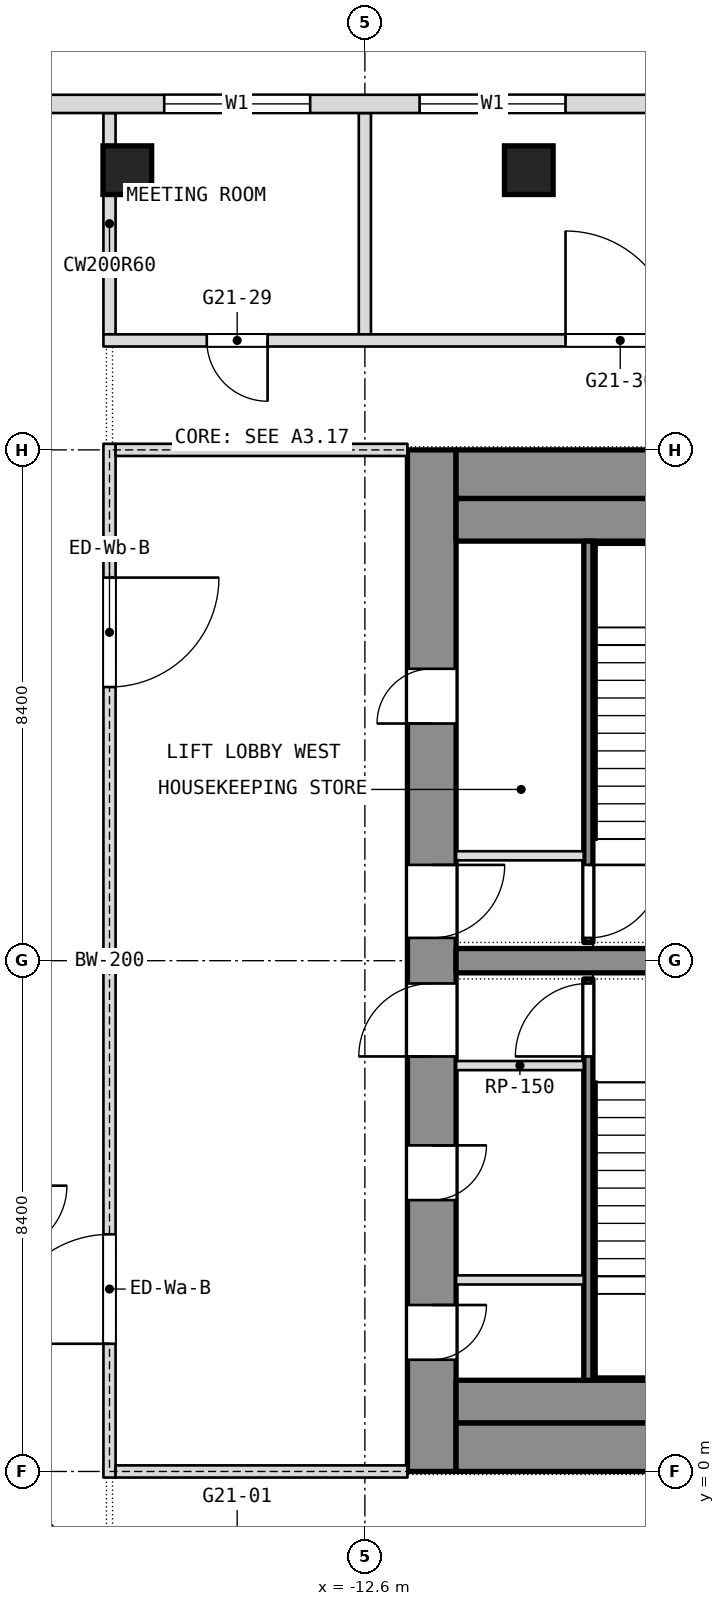
"""IFC4 building model, lengths in metres.
Left out: names, types, materials, properties, quantities, classifications, styles, units other than length and angle.
Written with IfcOpenShell. Run it as: python <this file> out.ifc"""

import sys

from ifc_helpers import new_model, si_unit, direction, frame, frame_2d, origin, origin_2d, place, context, subcontext, project, spatial, rectangle, extrude, element, fill, save


model = new_model("IFC4")
c1 = context("Model", 3, precision=1e-05, world=origin(), true_north=direction((0.0, 1.0)))
c2 = subcontext(c1, "Body", "Model", "MODEL_VIEW")
j1 = project(units=[si_unit("LENGTHUNIT", "METRE"), si_unit("PLANEANGLEUNIT", "RADIAN")], contexts=[c1])
p1 = place(None, origin())
s1 = spatial("IfcSite", under=j1, at=p1, CompositionType="ELEMENT")
p2 = place(p1, origin())
s2 = spatial("IfcBuilding", under=s1, at=p2, CompositionType="ELEMENT")
p3 = place(p2, frame((0.0, 0.0, 241.7)))
s3 = spatial("IfcBuildingStorey", under=s2, at=p3, CompositionType="ELEMENT", Elevation=241.7)
p4 = place(p3, frame((-11.5, 0.0, 0.0), z_axis=(0.0, 0.0, 1.0), x_axis=(0.0, 1.0, 0.0)))
e1 = element("IfcWall", 1, at=p4, inside=s3, PredefinedType="SHEAR", context=c2, shape_type="SweptSolid", body=[
    extrude(rectangle(XDim=16.8, YDim=0.8, at=frame_2d((8.4, 0.0))), origin(), (0.0, 0.0, 1.0), 3.6),
])
p5 = place(p4, frame((1.837, 0.0, 0.0)))
e2 = element("IfcOpeningElement", 2, at=p5, cuts=e1, PredefinedType="OPENING", context=c2, shape_type="SweptSolid", body=[
    extrude(rectangle(XDim=0.9, YDim=2.1, at=frame_2d((0.45, 1.05))), frame((0.0, 0.4, 0.0), z_axis=(0.0, -1.0, 0.0), x_axis=(1.0, 0.0, 0.0)), (0.0, 0.0, 1.0), 0.8),
])
p6 = place(p4, frame((4.462, 0.0, 0.0)))
e3 = element("IfcOpeningElement", 3, at=p6, cuts=e1, PredefinedType="OPENING", context=c2, shape_type="SweptSolid", body=[
    extrude(rectangle(XDim=0.9, YDim=2.1, at=frame_2d((0.45, 1.05))), frame((0.0, 0.4, 0.0), z_axis=(0.0, -1.0, 0.0), x_axis=(1.0, 0.0, 0.0)), (0.0, 0.0, 1.0), 0.8),
])
p7 = place(p4, frame((6.825, 0.0, 0.0)))
e4 = element("IfcOpeningElement", 4, at=p7, cuts=e1, PredefinedType="OPENING", context=c2, shape_type="SweptSolid", body=[
    extrude(rectangle(XDim=1.2, YDim=2.1, at=frame_2d((0.6, 1.05))), frame((0.0, 0.4, 0.0), z_axis=(0.0, -1.0, 0.0), x_axis=(1.0, 0.0, 0.0)), (0.0, 0.0, 1.0), 0.8),
])
p8 = place(p4, frame((12.3, 0.0, 0.0)))
e5 = element("IfcOpeningElement", 5, at=p8, cuts=e1, PredefinedType="OPENING", context=c2, shape_type="SweptSolid", body=[
    extrude(rectangle(XDim=0.9, YDim=2.1, at=frame_2d((0.45, 1.05))), frame((0.0, 0.4, 0.0), z_axis=(0.0, -1.0, 0.0), x_axis=(1.0, 0.0, 0.0)), (0.0, 0.0, 1.0), 0.8),
])
p9 = place(p4, frame((8.775, 0.0, 0.0)))
e6 = element("IfcOpeningElement", 6, at=p9, cuts=e1, PredefinedType="OPENING", context=c2, shape_type="SweptSolid", body=[
    extrude(rectangle(XDim=1.2, YDim=2.1, at=frame_2d((0.6, 1.05))), frame((0.0, 0.4, 0.0), z_axis=(0.0, -1.0, 0.0), x_axis=(1.0, 0.0, 0.0)), (0.0, 0.0, 1.0), 0.8),
])
for number, where, z_axis, x_axis in (
    (7, (-11.1, 0.4, 0.0), (0.0, 0.0, 1.0), (1.0, 0.0, 0.0)),
    (8, (-11.1, 16.4, 0.0), (0.0, 0.0, 1.0), (1.0, 0.0, 0.0)),
):
    element("IfcWall", number, at=place(p3, frame(where, z_axis=z_axis, x_axis=x_axis)), inside=s3, PredefinedType="SHEAR", context=c2, shape_type="SweptSolid", body=[
        extrude(rectangle(XDim=22.2, YDim=0.8, at=frame_2d((11.1, 0.0))), origin(), (0.0, 0.0, 1.0), 3.6),
    ])
p10 = place(p3, frame((-11.1, 8.4, 0.0), z_axis=(0.0, 0.0, 1.0), x_axis=(1.0, 0.0, 0.0)))
e9 = element("IfcWall", 9, at=p10, inside=s3, PredefinedType="SHEAR", context=c2, shape_type="SweptSolid", body=[
    extrude(rectangle(XDim=6.7, YDim=0.4, at=frame_2d((3.35, 0.0))), origin(), (0.0, 0.0, 1.0), 3.6),
])
for number, where, z_axis, x_axis in (
    (10, (-16.507, 21.4, 0.0), (0.0, 0.0, 1.0), (1.0, 0.0, 0.0)),
    (11, (-9.904, 21.4, 0.0), (0.0, 0.0, 1.0), (1.0, 0.0, 0.0)),
):
    element("IfcColumn", number, at=place(p3, frame(where, z_axis=z_axis, x_axis=x_axis)), inside=s3, PredefinedType="COLUMN", context=c2, shape_type="SweptSolid", body=[
        extrude(rectangle(XDim=0.8, YDim=0.8, at=origin_2d()), origin(), (0.0, 0.0, 1.0), 3.6),
    ])
for number, where, z_axis, x_axis in (
    (12, (-12.6, 18.7, 0.0), (0.0, 0.0, 1.0), (0.0, 1.0, 0.0)),
    (13, (-16.8, 18.7, 0.0), (0.0, 0.0, 1.0), (0.0, 1.0, 0.0)),
):
    element("IfcWall", number, at=place(p3, frame(where, z_axis=z_axis, x_axis=x_axis)), inside=s3, PredefinedType="PARTITIONING", context=c2, shape_type="SweptSolid", body=[
        extrude(rectangle(XDim=3.64, YDim=0.2, at=frame_2d((1.82, 0.0))), origin(), (0.0, 0.0, 1.0), 3.34),
    ])
p11 = place(p3, frame((-16.9, 18.6, 0.0), z_axis=(0.0, 0.0, 1.0), x_axis=(1.0, 0.0, 0.0)))
e14 = element("IfcWall", 14, at=p11, inside=s3, PredefinedType="PARTITIONING", context=c2, shape_type="SweptSolid", body=[
    extrude(rectangle(XDim=33.8, YDim=0.2, at=frame_2d((16.9, 0.0))), origin(), (0.0, 0.0, 1.0), 3.34),
])
p12 = place(p11, frame((1.7, 0.0, 0.0)))
e15 = element("IfcOpeningElement", 15, at=p12, cuts=e14, PredefinedType="OPENING", context=c2, shape_type="SweptSolid", body=[
    extrude(rectangle(XDim=1.0, YDim=2.1, at=frame_2d((0.5, 1.05))), frame((0.0, 0.1, 0.0), z_axis=(0.0, -1.0, 0.0), x_axis=(1.0, 0.0, 0.0)), (0.0, 0.0, 1.0), 0.2),
])
p13 = place(p11, frame((7.6, 0.0, 0.0)))
e16 = element("IfcOpeningElement", 16, at=p13, cuts=e14, PredefinedType="OPENING", context=c2, shape_type="SweptSolid", body=[
    extrude(rectangle(XDim=1.8, YDim=2.1, at=frame_2d((0.9, 1.05))), frame((0.0, 0.1, 0.0), z_axis=(0.0, -1.0, 0.0), x_axis=(1.0, 0.0, 0.0)), (0.0, 0.0, 1.0), 0.2),
])
p14 = place(p11, frame((16.0, 0.0, 0.0)))
e17 = element("IfcOpeningElement", 17, at=p14, cuts=e14, PredefinedType="OPENING", context=c2, shape_type="SweptSolid", body=[
    extrude(rectangle(XDim=1.8, YDim=2.1, at=frame_2d((0.9, 1.05))), frame((0.0, 0.1, 0.0), z_axis=(0.0, -1.0, 0.0), x_axis=(1.0, 0.0, 0.0)), (0.0, 0.0, 1.0), 0.2),
])
p15 = place(p11, frame((31.1, 0.0, 0.0)))
e18 = element("IfcOpeningElement", 18, at=p15, cuts=e14, PredefinedType="OPENING", context=c2, shape_type="SweptSolid", body=[
    extrude(rectangle(XDim=1.0, YDim=2.1, at=frame_2d((0.5, 1.05))), frame((0.0, 0.1, 0.0), z_axis=(0.0, -1.0, 0.0), x_axis=(1.0, 0.0, 0.0)), (0.0, 0.0, 1.0), 0.2),
])
p16 = place(p11, frame((22.7, 0.0, 0.0)))
e19 = element("IfcOpeningElement", 19, at=p16, cuts=e14, PredefinedType="OPENING", context=c2, shape_type="SweptSolid", body=[
    extrude(rectangle(XDim=1.0, YDim=2.1, at=frame_2d((0.5, 1.05))), frame((0.0, 0.1, 0.0), z_axis=(0.0, -1.0, 0.0), x_axis=(1.0, 0.0, 0.0)), (0.0, 0.0, 1.0), 0.2),
])
p17 = place(p11, frame((26.9, 0.0, 0.0)))
e20 = element("IfcOpeningElement", 20, at=p17, cuts=e14, PredefinedType="OPENING", context=c2, shape_type="SweptSolid", body=[
    extrude(rectangle(XDim=1.0, YDim=2.1, at=frame_2d((0.5, 1.05))), frame((0.0, 0.1, 0.0), z_axis=(0.0, -1.0, 0.0), x_axis=(1.0, 0.0, 0.0)), (0.0, 0.0, 1.0), 0.2),
])
p18 = place(p3, frame((19.206, 22.49, 0.0), z_axis=(0.0, 0.0, 1.0), x_axis=(-1.0, 0.0, 0.0)))
e21 = element("IfcWall", 21, at=p18, inside=s3, PredefinedType="NOTDEFINED", context=c2, shape_type="SweptSolid", body=[
    extrude(rectangle(XDim=38.412, YDim=0.3, at=frame_2d((19.206, 0.0))), origin(), (0.0, 0.0, 1.0), 3.6),
])
p19 = place(p18, frame((3.306, 0.0, 0.9)))
e22 = element("IfcOpeningElement", 22, at=p19, cuts=e21, PredefinedType="OPENING", context=c2, shape_type="SweptSolid", body=[
    extrude(rectangle(XDim=2.4, YDim=2.1, at=frame_2d((1.2, 1.05))), frame((0.0, 0.15, 0.0), z_axis=(0.0, -1.0, 0.0), x_axis=(1.0, 0.0, 0.0)), (0.0, 0.0, 1.0), 0.3),
])
p20 = place(p18, frame((7.506, 0.0, 0.9)))
e23 = element("IfcOpeningElement", 23, at=p20, cuts=e21, PredefinedType="OPENING", context=c2, shape_type="SweptSolid", body=[
    extrude(rectangle(XDim=2.4, YDim=2.1, at=frame_2d((1.2, 1.05))), frame((0.0, 0.15, 0.0), z_axis=(0.0, -1.0, 0.0), x_axis=(1.0, 0.0, 0.0)), (0.0, 0.0, 1.0), 0.3),
])
p21 = place(p18, frame((11.706, 0.0, 0.9)))
e24 = element("IfcOpeningElement", 24, at=p21, cuts=e21, PredefinedType="OPENING", context=c2, shape_type="SweptSolid", body=[
    extrude(rectangle(XDim=2.4, YDim=2.1, at=frame_2d((1.2, 1.05))), frame((0.0, 0.15, 0.0), z_axis=(0.0, -1.0, 0.0), x_axis=(1.0, 0.0, 0.0)), (0.0, 0.0, 1.0), 0.3),
])
p22 = place(p18, frame((15.906, 0.0, 0.9)))
e25 = element("IfcOpeningElement", 25, at=p22, cuts=e21, PredefinedType="OPENING", context=c2, shape_type="SweptSolid", body=[
    extrude(rectangle(XDim=2.4, YDim=2.1, at=frame_2d((1.2, 1.05))), frame((0.0, 0.15, 0.0), z_axis=(0.0, -1.0, 0.0), x_axis=(1.0, 0.0, 0.0)), (0.0, 0.0, 1.0), 0.3),
])
p23 = place(p18, frame((20.106, 0.0, 0.9)))
e26 = element("IfcOpeningElement", 26, at=p23, cuts=e21, PredefinedType="OPENING", context=c2, shape_type="SweptSolid", body=[
    extrude(rectangle(XDim=2.4, YDim=2.1, at=frame_2d((1.2, 1.05))), frame((0.0, 0.15, 0.0), z_axis=(0.0, -1.0, 0.0), x_axis=(1.0, 0.0, 0.0)), (0.0, 0.0, 1.0), 0.3),
])
p24 = place(p18, frame((24.306, 0.0, 0.9)))
e27 = element("IfcOpeningElement", 27, at=p24, cuts=e21, PredefinedType="OPENING", context=c2, shape_type="SweptSolid", body=[
    extrude(rectangle(XDim=2.4, YDim=2.1, at=frame_2d((1.2, 1.05))), frame((0.0, 0.15, 0.0), z_axis=(0.0, -1.0, 0.0), x_axis=(1.0, 0.0, 0.0)), (0.0, 0.0, 1.0), 0.3),
])
p25 = place(p18, frame((28.506, 0.0, 0.9)))
e28 = element("IfcOpeningElement", 28, at=p25, cuts=e21, PredefinedType="OPENING", context=c2, shape_type="SweptSolid", body=[
    extrude(rectangle(XDim=2.4, YDim=2.1, at=frame_2d((1.2, 1.05))), frame((0.0, 0.15, 0.0), z_axis=(0.0, -1.0, 0.0), x_axis=(1.0, 0.0, 0.0)), (0.0, 0.0, 1.0), 0.3),
])
p26 = place(p18, frame((32.706, 0.0, 0.9)))
e29 = element("IfcOpeningElement", 29, at=p26, cuts=e21, PredefinedType="OPENING", context=c2, shape_type="SweptSolid", body=[
    extrude(rectangle(XDim=2.4, YDim=2.1, at=frame_2d((1.2, 1.05))), frame((0.0, 0.15, 0.0), z_axis=(0.0, -1.0, 0.0), x_axis=(1.0, 0.0, 0.0)), (0.0, 0.0, 1.0), 0.3),
])
for number, where, z_axis, x_axis in (
    (30, (-11.1, 1.15, 0.0), (0.0, 0.0, 1.0), (1.0, 0.0, 0.0)),
    (31, (-11.1, 15.65, 0.0), (0.0, 0.0, 1.0), (1.0, 0.0, 0.0)),
):
    element("IfcWall", number, at=place(p3, frame(where, z_axis=z_axis, x_axis=x_axis)), inside=s3, PredefinedType="PARTITIONING", context=c2, shape_type="SweptSolid", body=[
        extrude(rectangle(XDim=22.2, YDim=0.7, at=frame_2d((11.1, 0.0))), origin(), (0.0, 0.0, 1.0), 3.34),
    ])
p27 = place(p3, frame((-8.925, 1.5, 0.0), z_axis=(0.0, 0.0, 1.0), x_axis=(0.0, 1.0, 0.0)))
e32 = element("IfcWall", 32, at=p27, inside=s3, PredefinedType="SHEAR", context=c2, shape_type="SweptSolid", body=[
    extrude(rectangle(XDim=6.6, YDim=0.15, at=frame_2d((3.3, 0.0))), origin(), (0.0, 0.0, 1.0), 3.34),
])
p28 = place(p27, frame((5.325, 0.0, 0.0)))
e33 = element("IfcOpeningElement", 33, at=p28, cuts=e32, PredefinedType="OPENING", context=c2, shape_type="SweptSolid", body=[
    extrude(rectangle(XDim=1.2, YDim=2.1, at=frame_2d((0.6, 1.05))), frame((0.0, 0.075, 0.0), z_axis=(0.0, -1.0, 0.0), x_axis=(1.0, 0.0, 0.0)), (0.0, 0.0, 1.0), 0.15),
])
for number, where, z_axis, x_axis in (
    (34, (-11.1, 6.675, 0.0), (0.0, 0.0, 1.0), (1.0, 0.0, 0.0)),
    (35, (-11.1, 3.15, 0.0), (0.0, 0.0, 1.0), (1.0, 0.0, 0.0)),
):
    element("IfcWall", number, at=place(p3, frame(where, z_axis=z_axis, x_axis=x_axis)), inside=s3, PredefinedType="PARTITIONING", context=c2, shape_type="SweptSolid", body=[
        extrude(rectangle(XDim=2.1, YDim=0.15, at=frame_2d((1.05, 0.0))), origin(), (0.0, 0.0, 1.0), 3.34),
    ])
p29 = place(p3, frame((-8.925, 8.7, 0.0), z_axis=(0.0, 0.0, 1.0), x_axis=(0.0, 1.0, 0.0)))
e36 = element("IfcWall", 36, at=p29, inside=s3, PredefinedType="SHEAR", context=c2, shape_type="SweptSolid", body=[
    extrude(rectangle(XDim=6.6, YDim=0.15, at=frame_2d((3.3, 0.0))), origin(), (0.0, 0.0, 1.0), 3.34),
])
p30 = place(p29, frame((0.075, 0.0, 0.0)))
e37 = element("IfcOpeningElement", 37, at=p30, cuts=e36, PredefinedType="OPENING", context=c2, shape_type="SweptSolid", body=[
    extrude(rectangle(XDim=1.2, YDim=2.1, at=frame_2d((0.6, 1.05))), frame((0.0, 0.075, 0.0), z_axis=(0.0, -1.0, 0.0), x_axis=(1.0, 0.0, 0.0)), (0.0, 0.0, 1.0), 0.15),
])
p31 = place(p3, frame((-11.1, 10.125, 0.0), z_axis=(0.0, 0.0, 1.0), x_axis=(1.0, 0.0, 0.0)))
e38 = element("IfcWall", 38, at=p31, inside=s3, PredefinedType="PARTITIONING", context=c2, shape_type="SweptSolid", body=[
    extrude(rectangle(XDim=2.1, YDim=0.15, at=frame_2d((1.05, 0.0))), origin(), (0.0, 0.0, 1.0), 3.34),
])
p32 = place(p3, frame((-16.8, -0.1, 0.0), z_axis=(0.0, 0.0, 1.0), x_axis=(0.0, 1.0, 0.0)))
e39 = element("IfcWall", 39, at=p32, inside=s3, PredefinedType="PARTITIONING", context=c2, shape_type="SweptSolid", body=[
    extrude(rectangle(XDim=17.0, YDim=0.2, at=frame_2d((8.5, 0.0))), origin(), (0.0, 0.0, 1.0), 3.34),
])
p33 = place(p32, frame((2.2, 0.0, 0.0)))
e40 = element("IfcOpeningElement", 40, at=p33, cuts=e39, PredefinedType="OPENING", context=c2, shape_type="SweptSolid", body=[
    extrude(rectangle(XDim=1.8, YDim=2.1, at=frame_2d((0.9, 1.05))), frame((0.0, 0.1, 0.0), z_axis=(0.0, -1.0, 0.0), x_axis=(1.0, 0.0, 0.0)), (0.0, 0.0, 1.0), 0.2),
])
p34 = place(p32, frame((13.0, 0.0, 0.0)))
e41 = element("IfcOpeningElement", 41, at=p34, cuts=e39, PredefinedType="OPENING", context=c2, shape_type="SweptSolid", body=[
    extrude(rectangle(XDim=1.8, YDim=2.1, at=frame_2d((0.9, 1.05))), frame((0.0, 0.1, 0.0), z_axis=(0.0, -1.0, 0.0), x_axis=(1.0, 0.0, 0.0)), (0.0, 0.0, 1.0), 0.2),
])
for number, where, z_axis, x_axis in (
    (42, (-16.7, 0.0, 0.0), (0.0, 0.0, 1.0), (1.0, 0.0, 0.0)),
    (43, (-16.7, 16.8, 0.0), (0.0, 0.0, 1.0), (1.0, 0.0, 0.0)),
):
    element("IfcWall", number, at=place(p3, frame(where, z_axis=z_axis, x_axis=x_axis)), inside=s3, PredefinedType="PARTITIONING", context=c2, shape_type="SweptSolid", body=[
        extrude(rectangle(XDim=4.8, YDim=0.2, at=frame_2d((2.4, 0.0))), origin(), (0.0, 0.0, 1.0), 2.94),
    ])
p35 = place(p12, origin())
e44 = element("IfcDoor", 44, at=p35, inside=s3, OperationType="SINGLE_SWING_LEFT", PredefinedType="DOOR", context=c2, shape_type="SweptSolid", body=[
    extrude(rectangle(XDim=1.0, YDim=2.1, at=frame_2d((0.5, 1.05))), frame((0.0, 0.025, 0.0), z_axis=(0.0, -1.0, 0.0), x_axis=(1.0, 0.0, 0.0)), (0.0, 0.0, 1.0), 0.05),
])
fill(e15, e44)
p36 = place(p13, origin())
e45 = element("IfcDoor", 45, at=p36, inside=s3, OperationType="DOUBLE_DOOR_SINGLE_SWING", PredefinedType="DOOR", context=c2, shape_type="SweptSolid", body=[
    extrude(rectangle(XDim=1.8, YDim=2.1, at=frame_2d((0.9, 1.05))), frame((0.0, 0.025, 0.0), z_axis=(0.0, -1.0, 0.0), x_axis=(1.0, 0.0, 0.0)), (0.0, 0.0, 1.0), 0.05),
])
fill(e16, e45)
p37 = place(p25, origin())
e46 = element("IfcWindow", 46, at=p37, inside=s3, PartitioningType="SINGLE_PANEL", PredefinedType="WINDOW", context=c2, shape_type="SweptSolid", body=[
    extrude(rectangle(XDim=2.4, YDim=2.1, at=frame_2d((1.2, 1.05))), frame((0.0, 0.03, 0.0), z_axis=(0.0, -1.0, 0.0), x_axis=(1.0, 0.0, 0.0)), (0.0, 0.0, 1.0), 0.06),
])
fill(e28, e46)
p38 = place(p26, origin())
e47 = element("IfcWindow", 47, at=p38, inside=s3, PartitioningType="SINGLE_PANEL", PredefinedType="WINDOW", context=c2, shape_type="SweptSolid", body=[
    extrude(rectangle(XDim=2.4, YDim=2.1, at=frame_2d((1.2, 1.05))), frame((0.0, 0.03, 0.0), z_axis=(0.0, -1.0, 0.0), x_axis=(1.0, 0.0, 0.0)), (0.0, 0.0, 1.0), 0.06),
])
fill(e29, e47)
p39 = place(p5, origin())
e48 = element("IfcDoor", 48, at=p39, inside=s3, OperationType="SINGLE_SWING_LEFT", PredefinedType="DOOR", context=c2, shape_type="SweptSolid", body=[
    extrude(rectangle(XDim=0.9, YDim=2.1, at=frame_2d((0.45, 1.05))), frame((0.0, 0.025, 0.0), z_axis=(0.0, -1.0, 0.0), x_axis=(1.0, 0.0, 0.0)), (0.0, 0.0, 1.0), 0.05),
])
fill(e2, e48)
p40 = place(p6, origin())
e49 = element("IfcDoor", 49, at=p40, inside=s3, OperationType="SINGLE_SWING_LEFT", PredefinedType="DOOR", context=c2, shape_type="SweptSolid", body=[
    extrude(rectangle(XDim=0.9, YDim=2.1, at=frame_2d((0.45, 1.05))), frame((0.0, 0.025, 0.0), z_axis=(0.0, -1.0, 0.0), x_axis=(1.0, 0.0, 0.0)), (0.0, 0.0, 1.0), 0.05),
])
fill(e3, e49)
p41 = place(p7, origin())
e50 = element("IfcDoor", 50, at=p41, inside=s3, OperationType="SINGLE_SWING_LEFT", PredefinedType="DOOR", context=c2, shape_type="SweptSolid", body=[
    extrude(rectangle(XDim=1.2, YDim=2.1, at=frame_2d((0.6, 1.05))), frame((0.0, 0.025, 0.0), z_axis=(0.0, -1.0, 0.0), x_axis=(1.0, 0.0, 0.0)), (0.0, 0.0, 1.0), 0.05),
])
fill(e4, e50)
p42 = place(p28, origin())
e51 = element("IfcDoor", 51, at=p42, inside=s3, OperationType="SINGLE_SWING_LEFT", PredefinedType="DOOR", context=c2, shape_type="SweptSolid", body=[
    extrude(rectangle(XDim=1.2, YDim=2.1, at=frame_2d((0.6, 1.05))), frame((0.0, 0.025, 0.0), z_axis=(0.0, -1.0, 0.0), x_axis=(1.0, 0.0, 0.0)), (0.0, 0.0, 1.0), 0.05),
])
fill(e33, e51)
p43 = place(p8, origin())
e52 = element("IfcDoor", 52, at=p43, inside=s3, OperationType="SINGLE_SWING_LEFT", PredefinedType="DOOR", context=c2, shape_type="SweptSolid", body=[
    extrude(rectangle(XDim=0.9, YDim=2.1, at=frame_2d((0.45, 1.05))), frame((0.0, 0.025, 0.0), z_axis=(0.0, -1.0, 0.0), x_axis=(1.0, 0.0, 0.0)), (0.0, 0.0, 1.0), 0.05),
])
fill(e5, e52)
p44 = place(p9, origin())
e53 = element("IfcDoor", 53, at=p44, inside=s3, OperationType="SINGLE_SWING_LEFT", PredefinedType="DOOR", context=c2, shape_type="SweptSolid", body=[
    extrude(rectangle(XDim=1.2, YDim=2.1, at=frame_2d((0.6, 1.05))), frame((0.0, 0.025, 0.0), z_axis=(0.0, -1.0, 0.0), x_axis=(1.0, 0.0, 0.0)), (0.0, 0.0, 1.0), 0.05),
])
fill(e6, e53)
p45 = place(p30, origin())
e54 = element("IfcDoor", 54, at=p45, inside=s3, OperationType="SINGLE_SWING_LEFT", PredefinedType="DOOR", context=c2, shape_type="SweptSolid", body=[
    extrude(rectangle(XDim=1.2, YDim=2.1, at=frame_2d((0.6, 1.05))), frame((0.0, 0.025, 0.0), z_axis=(0.0, -1.0, 0.0), x_axis=(1.0, 0.0, 0.0)), (0.0, 0.0, 1.0), 0.05),
])
fill(e37, e54)
p46 = place(p33, origin())
e55 = element("IfcDoor", 55, at=p46, inside=s3, OperationType="DOUBLE_DOOR_SINGLE_SWING", PredefinedType="DOOR", context=c2, shape_type="SweptSolid", body=[
    extrude(rectangle(XDim=1.8, YDim=2.1, at=frame_2d((0.9, 1.05))), frame((0.0, 0.025, 0.0), z_axis=(0.0, -1.0, 0.0), x_axis=(1.0, 0.0, 0.0)), (0.0, 0.0, 1.0), 0.05),
])
fill(e40, e55)
p47 = place(p34, origin())
e56 = element("IfcDoor", 56, at=p47, inside=s3, OperationType="DOUBLE_DOOR_SINGLE_SWING", PredefinedType="DOOR", context=c2, shape_type="SweptSolid", body=[
    extrude(rectangle(XDim=1.8, YDim=2.1, at=frame_2d((0.9, 1.05))), frame((0.0, 0.025, 0.0), z_axis=(0.0, -1.0, 0.0), x_axis=(1.0, 0.0, 0.0)), (0.0, 0.0, 1.0), 0.05),
])
fill(e41, e56)
save(model, sys.argv[1])
